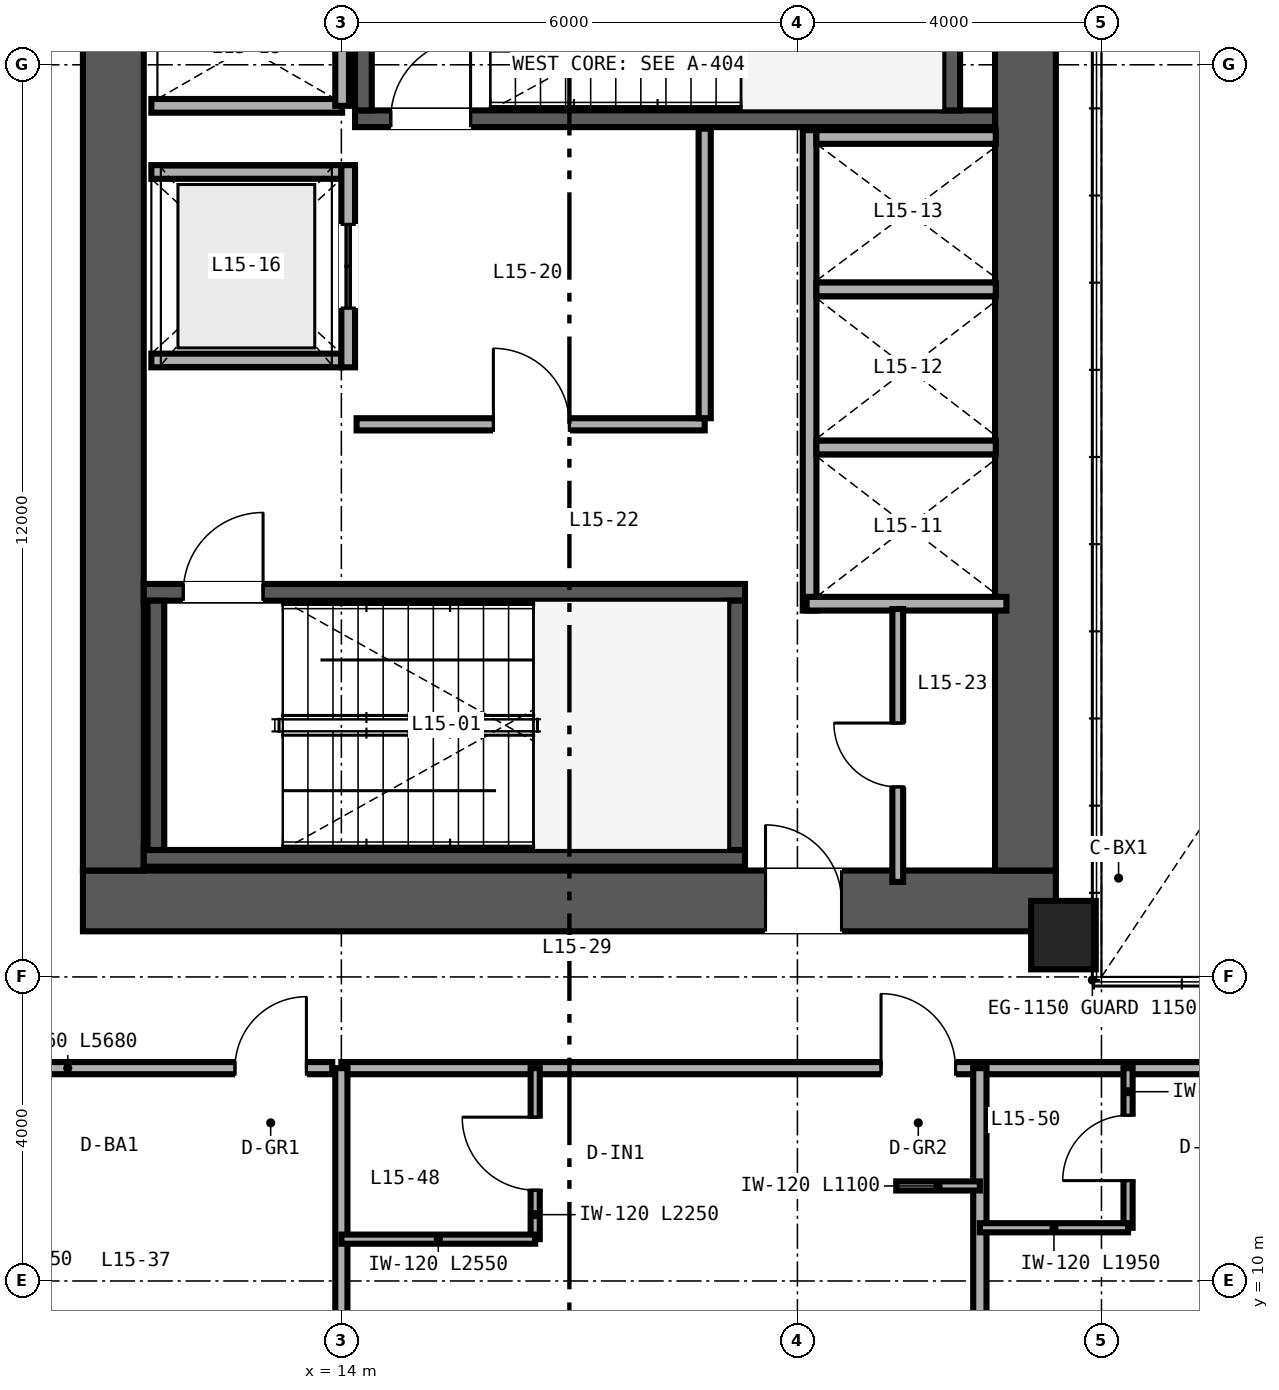
"""IFC4 building model, lengths in metres.
Left out: names, types, materials, properties, quantities, classifications, styles, units other than length and angle.
Written with IfcOpenShell. Run it as: python <this file> out.ifc"""

import sys

from ifc_helpers import new_model, si_unit, direction, frame, frame_2d, origin, origin_2d, place, context, subcontext, project, spatial, rectangle, hollow_rectangle, extrude, source, transform, mapped, element, fill, save


model = new_model("IFC4")
c1 = context("Model", 3, precision=1e-05, world=origin(), true_north=direction((0.0, 1.0)))
c2 = subcontext(c1, "Body", "Model", "MODEL_VIEW")
j1 = project(units=[si_unit("LENGTHUNIT", "METRE"), si_unit("PLANEANGLEUNIT", "RADIAN")], contexts=[c1])
p1 = place(None, origin())
s1 = spatial("IfcSite", under=j1, at=p1, CompositionType="ELEMENT")
p2 = place(p1, origin())
s2 = spatial("IfcBuilding", under=s1, at=p2, CompositionType="ELEMENT")
p3 = place(p2, frame((0.0, 0.0, 63.6)))
s3 = spatial("IfcBuildingStorey", under=s2, at=p3, CompositionType="ELEMENT", Elevation=63.6)
p4 = place(p3, frame((10.6, 15.0, 0.0), z_axis=(0.0, 0.0, 1.0), x_axis=(1.0, 0.0, 0.0)))
e1 = element("IfcWall", 1, at=p4, inside=s3, PredefinedType="SHEAR", context=c2, shape_type="SweptSolid", body=[
    extrude(rectangle(XDim=12.8, YDim=0.8, at=frame_2d((6.4, 0.0))), origin(), (0.0, 0.0, 1.0), 3.35),
])
p5 = place(p4, frame((8.98, 0.0, 0.0)))
e2 = element("IfcOpeningElement", 2, at=p5, cuts=e1, PredefinedType="OPENING", context=c2, shape_type="SweptSolid", body=[
    extrude(rectangle(XDim=1.0, YDim=2.15, at=frame_2d((0.5, 1.075))), frame((0.0, 0.41, 0.0), z_axis=(0.0, -1.0, 0.0), x_axis=(1.0, 0.0, 0.0)), (0.0, 0.0, 1.0), 0.82),
])
for number, where, z_axis, x_axis in (
    (3, (11.0, 15.4, 0.0), (0.0, 0.0, 1.0), (0.0, 1.0, 0.0)),
    (4, (23.0, 15.4, 0.0), (0.0, 0.0, 1.0), (0.0, 1.0, 0.0)),
):
    element("IfcWall", number, at=place(p3, frame(where, z_axis=z_axis, x_axis=x_axis)), inside=s3, PredefinedType="SHEAR", context=c2, shape_type="SweptSolid", body=[
        extrude(rectangle(XDim=21.2, YDim=0.8, at=frame_2d((10.6, 0.0))), origin(), (0.0, 0.0, 1.0), 3.35),
    ])
p6 = place(p3, frame((11.4, 15.56, 0.0), z_axis=(0.0, 0.0, 1.0), x_axis=(1.0, 0.0, 0.0)))
e5 = element("IfcWall", 5, at=p6, inside=s3, PredefinedType="SHEAR", context=c2, shape_type="SweptSolid", body=[
    extrude(rectangle(XDim=7.91, YDim=0.22, at=frame_2d((3.955, 0.0))), origin(), (0.0, 0.0, 1.0), 3.4),
])
p7 = place(p3, frame((11.4, 19.06, 0.0), z_axis=(0.0, 0.0, 1.0), x_axis=(1.0, 0.0, 0.0)))
e6 = element("IfcWall", 6, at=p7, inside=s3, PredefinedType="SHEAR", context=c2, shape_type="SweptSolid", body=[
    extrude(rectangle(XDim=7.91, YDim=0.22, at=frame_2d((3.955, 0.0))), origin(), (0.0, 0.0, 1.0), 3.4),
])
p8 = place(p7, frame((0.52, 0.0, 0.0)))
e7 = element("IfcOpeningElement", 7, at=p8, cuts=e6, PredefinedType="OPENING", context=c2, shape_type="SweptSolid", body=[
    extrude(rectangle(XDim=1.05, YDim=2.15, at=frame_2d((0.525, 1.075))), frame((0.0, 0.12, 0.0), z_axis=(0.0, -1.0, 0.0), x_axis=(1.0, 0.0, 0.0)), (0.0, 0.0, 1.0), 0.24),
])
for number, where, z_axis, x_axis in (
    (8, (11.56, 15.67, 0.0), (0.0, 0.0, 1.0), (0.0, 1.0, 0.0)),
    (9, (19.2, 15.67, 0.0), (0.0, 0.0, 1.0), (0.0, 1.0, 0.0)),
):
    element("IfcWall", number, at=place(p3, frame(where, z_axis=z_axis, x_axis=x_axis)), inside=s3, PredefinedType="SHEAR", context=c2, shape_type="SweptSolid", body=[
        extrude(rectangle(XDim=3.28, YDim=0.22, at=frame_2d((1.64, 0.0))), origin(), (0.0, 0.0, 1.0), 3.4),
    ])
p9 = place(p3, frame((14.18, 25.29, 0.0), z_axis=(0.0, 0.0, 1.0), x_axis=(1.0, 0.0, 0.0)))
e10 = element("IfcWall", 10, at=p9, inside=s3, PredefinedType="SHEAR", context=c2, shape_type="SweptSolid", body=[
    extrude(rectangle(XDim=8.42, YDim=0.22, at=frame_2d((4.21, 0.0))), origin(), (0.0, 0.0, 1.0), 3.4),
])
p10 = place(p9, frame((0.47, 0.0, 0.0)))
e11 = element("IfcOpeningElement", 11, at=p10, cuts=e10, PredefinedType="OPENING", context=c2, shape_type="SweptSolid", body=[
    extrude(rectangle(XDim=1.05, YDim=2.15, at=frame_2d((0.525, 1.075))), frame((0.0, 0.12, 0.0), z_axis=(0.0, -1.0, 0.0), x_axis=(1.0, 0.0, 0.0)), (0.0, 0.0, 1.0), 0.24),
])
for number, where, z_axis, x_axis in (
    (12, (14.29, 25.4, 0.0), (0.0, 0.0, 1.0), (0.0, 1.0, 0.0)),
    (13, (22.03, 25.4, 0.0), (0.0, 0.0, 1.0), (0.0, 1.0, 0.0)),
):
    element("IfcWall", number, at=place(p3, frame(where, z_axis=z_axis, x_axis=x_axis)), inside=s3, PredefinedType="SHEAR", context=c2, shape_type="SweptSolid", body=[
        extrude(rectangle(XDim=3.28, YDim=0.22, at=frame_2d((1.64, 0.0))), origin(), (0.0, 0.0, 1.0), 3.4),
    ])
m1 = source(origin(), c2, "Body", "SweptSolid", [
    extrude(hollow_rectangle(XDim=0.85, YDim=0.9, WallThickness=0.04, at=origin_2d()), origin(), (0.0, 0.0, 1.0), 3.35),
])
p11 = place(p3, frame((23.5, 14.55, 0.0), z_axis=(0.0, 0.0, 1.0), x_axis=(1.0, 0.0, 0.0)))
e14 = element("IfcColumn", 14, at=p11, inside=s3, PredefinedType="COLUMN", context=c2, shape_type="MappedRepresentation", body=[
    mapped(m1, transform((0.0, 0.0, 0.0), scale=1.0)),
])
p12 = place(p3, frame((20.16, 18.82, 0.0), z_axis=(0.0, 0.0, 1.0), x_axis=(0.0, 1.0, 0.0)))
e15 = element("IfcWall", 15, at=p12, inside=s3, PredefinedType="SOLIDWALL", context=c2, shape_type="SweptSolid", body=[
    extrude(rectangle(XDim=6.32, YDim=0.18, at=frame_2d((3.16, 0.0))), origin(), (0.0, 0.0, 1.0), 2.36),
])
p13 = place(p3, frame((20.12, 18.91, 0.0), z_axis=(0.0, 0.0, 1.0), x_axis=(1.0, 0.0, 0.0)))
e16 = element("IfcWall", 16, at=p13, inside=s3, PredefinedType="SOLIDWALL", context=c2, shape_type="SweptSolid", body=[
    extrude(rectangle(XDim=2.63, YDim=0.18, at=frame_2d((1.315, 0.0))), origin(), (0.0, 0.0, 1.0), 3.35),
])
p14 = place(p3, frame((20.25, 25.05, 0.0), z_axis=(0.0, 0.0, 1.0), x_axis=(1.0, 0.0, 0.0)))
e17 = element("IfcWall", 17, at=p14, inside=s3, PredefinedType="SOLIDWALL", context=c2, shape_type="SweptSolid", body=[
    extrude(rectangle(XDim=2.36, YDim=0.18, at=frame_2d((1.18, 0.0))), origin(), (0.0, 0.0, 1.0), 3.35),
])
p15 = place(p3, frame((20.25, 20.965, 0.0), z_axis=(0.0, 0.0, 1.0), x_axis=(1.0, 0.0, 0.0)))
e18 = element("IfcWall", 18, at=p15, inside=s3, PredefinedType="SOLIDWALL", context=c2, shape_type="SweptSolid", body=[
    extrude(rectangle(XDim=2.36, YDim=0.18, at=frame_2d((1.18, 0.0))), origin(), (0.0, 0.0, 1.0), 2.36),
])
p16 = place(p3, frame((20.25, 23.045, 0.0), z_axis=(0.0, 0.0, 1.0), x_axis=(1.0, 0.0, 0.0)))
e19 = element("IfcWall", 19, at=p16, inside=s3, PredefinedType="SOLIDWALL", context=c2, shape_type="SweptSolid", body=[
    extrude(rectangle(XDim=2.36, YDim=0.18, at=frame_2d((1.18, 0.0))), origin(), (0.0, 0.0, 1.0), 3.35),
])
for number, where, z_axis, x_axis in (
    (20, (11.5, 22.11, 0.0), (0.0, 0.0, 1.0), (1.0, 0.0, 0.0)),
    (21, (11.5, 24.59, 0.0), (0.0, 0.0, 1.0), (1.0, 0.0, 0.0)),
):
    element("IfcWall", number, at=place(p3, frame(where, z_axis=z_axis, x_axis=x_axis)), inside=s3, PredefinedType="SOLIDWALL", context=c2, shape_type="SweptSolid", body=[
        extrude(rectangle(XDim=2.5, YDim=0.18, at=frame_2d((1.25, 0.0))), origin(), (0.0, 0.0, 1.0), 3.35),
    ])
p17 = place(p3, frame((14.09, 22.02, 0.0), z_axis=(0.0, 0.0, 1.0), x_axis=(0.0, 1.0, 0.0)))
e22 = element("IfcWall", 22, at=p17, inside=s3, PredefinedType="SOLIDWALL", context=c2, shape_type="SweptSolid", body=[
    extrude(rectangle(XDim=2.66, YDim=0.18, at=frame_2d((1.33, 0.0))), origin(), (0.0, 0.0, 1.0), 3.35),
])
p18 = place(p17, frame((0.78, 0.0, 0.0)))
e23 = element("IfcOpeningElement", 23, at=p18, cuts=e22, PredefinedType="OPENING", context=c2, shape_type="SweptSolid", body=[
    extrude(rectangle(XDim=1.1, YDim=2.2, at=frame_2d((0.55, 1.1))), frame((0.0, 0.1, 0.0), z_axis=(0.0, -1.0, 0.0), x_axis=(1.0, 0.0, 0.0)), (0.0, 0.0, 1.0), 0.2),
])
p19 = place(p3, frame((11.5, 25.46, 0.0), z_axis=(0.0, 0.0, 1.0), x_axis=(1.0, 0.0, 0.0)))
e24 = element("IfcWall", 24, at=p19, inside=s3, PredefinedType="SOLIDWALL", context=c2, shape_type="SweptSolid", body=[
    extrude(rectangle(XDim=2.51, YDim=0.18, at=frame_2d((1.255, 0.0))), origin(), (0.0, 0.0, 1.0), 3.35),
])
p20 = place(p3, frame((14.01, 25.46, 0.0), z_axis=(0.0, 0.0, 1.0), x_axis=(0.0, 1.0, 0.0)))
e25 = element("IfcWall", 25, at=p20, inside=s3, PredefinedType="SOLIDWALL", context=c2, shape_type="SweptSolid", body=[
    extrude(rectangle(XDim=3.08, YDim=0.18, at=frame_2d((1.54, 0.0))), origin(), (0.0, 0.0, 1.0), 3.35),
])
p21 = place(p3, frame((14.2, 21.27, 0.0), z_axis=(0.0, 0.0, 1.0), x_axis=(1.0, 0.0, 0.0)))
e26 = element("IfcWall", 26, at=p21, inside=s3, PredefinedType="PARTITIONING", context=c2, shape_type="SweptSolid", body=[
    extrude(rectangle(XDim=4.58, YDim=0.16, at=frame_2d((2.29, 0.0))), origin(), (0.0, 0.0, 1.0), 3.35),
])
p22 = place(p21, frame((1.8, 0.0, 0.0)))
e27 = element("IfcOpeningElement", 27, at=p22, cuts=e26, PredefinedType="OPENING", context=c2, shape_type="SweptSolid", body=[
    extrude(rectangle(XDim=1.0, YDim=2.15, at=frame_2d((0.5, 1.075))), frame((0.0, 0.09, 0.0), z_axis=(0.0, -1.0, 0.0), x_axis=(1.0, 0.0, 0.0)), (0.0, 0.0, 1.0), 0.18),
])
p23 = place(p3, frame((18.78, 21.35, 0.0), z_axis=(0.0, 0.0, 1.0), x_axis=(0.0, 1.0, 0.0)))
e28 = element("IfcWall", 28, at=p23, inside=s3, PredefinedType="PARTITIONING", context=c2, shape_type="SweptSolid", body=[
    extrude(rectangle(XDim=3.81, YDim=0.16, at=frame_2d((1.905, 0.0))), origin(), (0.0, 0.0, 1.0), 3.35),
])
p24 = place(p3, frame((21.32, 15.25, 0.0), z_axis=(0.0, 0.0, 1.0), x_axis=(0.0, 1.0, 0.0)))
e29 = element("IfcWall", 29, at=p24, inside=s3, PredefinedType="PARTITIONING", context=c2, shape_type="SweptSolid", body=[
    extrude(rectangle(XDim=3.59, YDim=0.142, at=frame_2d((1.795, 0.0))), origin(), (0.0, 0.0, 1.0), 3.35),
])
p25 = place(p24, frame((1.25, 0.0, 0.0)))
e30 = element("IfcOpeningElement", 30, at=p25, cuts=e29, PredefinedType="OPENING", context=c2, shape_type="SweptSolid", body=[
    extrude(rectangle(XDim=0.84, YDim=2.1, at=frame_2d((0.42, 1.05))), frame((0.0, 0.081, 0.0), z_axis=(0.0, -1.0, 0.0), x_axis=(1.0, 0.0, 0.0)), (0.0, 0.0, 1.0), 0.162),
])
p26 = place(p3, frame((8.2, 12.8, 0.0), z_axis=(0.0, 0.0, 1.0), x_axis=(1.0, 0.0, 0.0)))
e31 = element("IfcWall", 31, at=p26, inside=s3, PredefinedType="PARTITIONING", context=c2, shape_type="SweptSolid", body=[
    extrude(rectangle(XDim=5.68, YDim=0.16, at=frame_2d((2.84, 0.0))), origin(), (0.0, 0.0, 1.0), 3.35),
])
p27 = place(p26, frame((4.4, 0.0, 0.0)))
e32 = element("IfcOpeningElement", 32, at=p27, cuts=e31, PredefinedType="OPENING", context=c2, shape_type="SweptSolid", body=[
    extrude(rectangle(XDim=0.94, YDim=2.15, at=frame_2d((0.47, 1.075))), frame((0.0, 0.09, 0.0), z_axis=(0.0, -1.0, 0.0), x_axis=(1.0, 0.0, 0.0)), (0.0, 0.0, 1.0), 0.18),
])
p28 = place(p3, frame((14.0, 12.8, 0.0), z_axis=(0.0, 0.0, 1.0), x_axis=(1.0, 0.0, 0.0)))
e33 = element("IfcWall", 33, at=p28, inside=s3, PredefinedType="PARTITIONING", context=c2, shape_type="SweptSolid", body=[
    extrude(rectangle(XDim=36.0, YDim=0.16, at=frame_2d((18.0, 0.0))), origin(), (0.0, 0.0, 1.0), 2.571),
])
p29 = place(p28, frame((7.1, 0.0, 0.0)))
e34 = element("IfcOpeningElement", 34, at=p29, cuts=e33, PredefinedType="OPENING", context=c2, shape_type="SweptSolid", body=[
    extrude(rectangle(XDim=0.98, YDim=2.2, at=frame_2d((0.49, 1.1))), frame((0.0, 0.09, 0.0), z_axis=(0.0, -1.0, 0.0), x_axis=(1.0, 0.0, 0.0)), (0.0, 0.0, 1.0), 0.18),
])
p30 = place(p28, frame((15.5, 0.0, 0.0)))
e35 = element("IfcOpeningElement", 35, at=p30, cuts=e33, PredefinedType="OPENING", context=c2, shape_type="SweptSolid", body=[
    extrude(rectangle(XDim=0.98, YDim=2.2, at=frame_2d((0.49, 1.1))), frame((0.0, 0.09, 0.0), z_axis=(0.0, -1.0, 0.0), x_axis=(1.0, 0.0, 0.0)), (0.0, 0.0, 1.0), 0.18),
])
p31 = place(p28, frame((23.9, 0.0, 0.0)))
e36 = element("IfcOpeningElement", 36, at=p31, cuts=e33, PredefinedType="OPENING", context=c2, shape_type="SweptSolid", body=[
    extrude(rectangle(XDim=0.98, YDim=2.2, at=frame_2d((0.49, 1.1))), frame((0.0, 0.09, 0.0), z_axis=(0.0, -1.0, 0.0), x_axis=(1.0, 0.0, 0.0)), (0.0, 0.0, 1.0), 0.18),
])
p32 = place(p28, frame((29.34, 0.0, 0.0)))
e37 = element("IfcOpeningElement", 37, at=p32, cuts=e33, PredefinedType="OPENING", context=c2, shape_type="SweptSolid", body=[
    extrude(rectangle(XDim=0.94, YDim=2.15, at=frame_2d((0.47, 1.075))), frame((0.0, 0.09, 0.0), z_axis=(0.0, -1.0, 0.0), x_axis=(1.0, 0.0, 0.0)), (0.0, 0.0, 1.0), 0.18),
])
p33 = place(p28, frame((34.74, 0.0, 0.0)))
e38 = element("IfcOpeningElement", 38, at=p33, cuts=e33, PredefinedType="OPENING", context=c2, shape_type="SweptSolid", body=[
    extrude(rectangle(XDim=0.94, YDim=2.15, at=frame_2d((0.47, 1.075))), frame((0.0, 0.09, 0.0), z_axis=(0.0, -1.0, 0.0), x_axis=(1.0, 0.0, 0.0)), (0.0, 0.0, 1.0), 0.18),
])
p34 = place(p3, frame((14.0, 2.36, 0.0), z_axis=(0.0, 0.0, 1.0), x_axis=(0.0, 1.0, 0.0)))
e39 = element("IfcWall", 39, at=p34, inside=s3, PredefinedType="PARTITIONING", context=c2, shape_type="SweptSolid", body=[
    extrude(rectangle(XDim=10.44, YDim=0.16, at=frame_2d((5.22, 0.0))), origin(), (0.0, 0.0, 1.0), 2.657),
])
p35 = place(p3, frame((22.4, 2.36, 0.0), z_axis=(0.0, 0.0, 1.0), x_axis=(0.0, 1.0, 0.0)))
e40 = element("IfcWall", 40, at=p35, inside=s3, PredefinedType="PARTITIONING", context=c2, shape_type="SweptSolid", body=[
    extrude(rectangle(XDim=10.44, YDim=0.175, at=frame_2d((5.22, 0.0))), origin(), (0.0, 0.0, 1.0), 2.813),
])
p36 = place(p3, frame((16.55, 10.55, 0.0), z_axis=(0.0, 0.0, 1.0), x_axis=(0.0, 1.0, 0.0)))
e41 = element("IfcWall", 41, at=p36, inside=s3, PredefinedType="PARTITIONING", context=c2, shape_type="SweptSolid", body=[
    extrude(rectangle(XDim=2.25, YDim=0.12, at=frame_2d((1.125, 0.0))), origin(), (0.0, 0.0, 1.0), 3.35),
])
p37 = place(p36, frame((0.645, 0.0, 0.0)))
e42 = element("IfcOpeningElement", 42, at=p37, cuts=e41, PredefinedType="OPENING", context=c2, shape_type="SweptSolid", body=[
    extrude(rectangle(XDim=0.96, YDim=2.15, at=frame_2d((0.48, 1.075))), frame((0.0, 0.07, 0.0), z_axis=(0.0, -1.0, 0.0), x_axis=(1.0, 0.0, 0.0)), (0.0, 0.0, 1.0), 0.14),
])
p38 = place(p3, frame((14.0, 10.55, 0.0), z_axis=(0.0, 0.0, 1.0), x_axis=(1.0, 0.0, 0.0)))
e43 = element("IfcWall", 43, at=p38, inside=s3, PredefinedType="PARTITIONING", context=c2, shape_type="SweptSolid", body=[
    extrude(rectangle(XDim=2.55, YDim=0.12, at=frame_2d((1.275, 0.0))), origin(), (0.0, 0.0, 1.0), 3.35),
])
p39 = place(p3, frame((21.3, 11.25, 0.0), z_axis=(0.0, 0.0, 1.0), x_axis=(1.0, 0.0, 0.0)))
e44 = element("IfcWall", 44, at=p39, inside=s3, PredefinedType="PARTITIONING", context=c2, shape_type="SweptSolid", body=[
    extrude(rectangle(XDim=1.1, YDim=0.12, at=frame_2d((0.55, 0.0))), origin(), (0.0, 0.0, 1.0), 3.35),
])
p40 = place(p3, frame((24.35, 10.7, 0.0), z_axis=(0.0, 0.0, 1.0), x_axis=(0.0, 1.0, 0.0)))
e45 = element("IfcWall", 45, at=p40, inside=s3, PredefinedType="PARTITIONING", context=c2, shape_type="SweptSolid", body=[
    extrude(rectangle(XDim=2.1, YDim=0.12, at=frame_2d((1.05, 0.0))), origin(), (0.0, 0.0, 1.0), 3.35),
])
p41 = place(p40, frame((0.62, 0.0, 0.0)))
e46 = element("IfcOpeningElement", 46, at=p41, cuts=e45, PredefinedType="OPENING", context=c2, shape_type="SweptSolid", body=[
    extrude(rectangle(XDim=0.86, YDim=2.1, at=frame_2d((0.43, 1.05))), frame((0.0, 0.07, 0.0), z_axis=(0.0, -1.0, 0.0), x_axis=(1.0, 0.0, 0.0)), (0.0, 0.0, 1.0), 0.14),
])
p42 = place(p3, frame((22.4, 10.7, 0.0), z_axis=(0.0, 0.0, 1.0), x_axis=(1.0, 0.0, 0.0)))
e47 = element("IfcWall", 47, at=p42, inside=s3, PredefinedType="PARTITIONING", context=c2, shape_type="SweptSolid", body=[
    extrude(rectangle(XDim=1.95, YDim=0.12, at=frame_2d((0.975, 0.0))), origin(), (0.0, 0.0, 1.0), 2.571),
])
m2 = source(origin(), c2, "Body", "SweptSolid", [
    extrude(rectangle(XDim=1.05, YDim=2.15, at=frame_2d((0.525, 1.075))), frame((0.0, 0.025, 0.0), z_axis=(0.0, -1.0, 0.0), x_axis=(1.0, 0.0, 0.0)), (0.0, 0.0, 1.0), 0.05),
])
p43 = place(p8, origin())
e48 = element("IfcDoor", 48, at=p43, inside=s3, OperationType="SINGLE_SWING_RIGHT", PredefinedType="DOOR", context=c2, shape_type="MappedRepresentation", body=[
    mapped(m2, transform((0.0, 0.0, 0.0), scale=1.0)),
])
fill(e7, e48)
p44 = place(p10, origin())
e49 = element("IfcDoor", 49, at=p44, inside=s3, OperationType="SINGLE_SWING_RIGHT", PredefinedType="DOOR", context=c2, shape_type="MappedRepresentation", body=[
    mapped(m2, transform((0.0, 0.0, 0.0), scale=1.0)),
])
fill(e11, e49)
m3 = source(origin(), c2, "Body", "SweptSolid", [
    extrude(rectangle(XDim=1.1, YDim=2.2, at=frame_2d((0.55, 1.1))), frame((0.0, 0.025, 0.0), z_axis=(0.0, -1.0, 0.0), x_axis=(1.0, 0.0, 0.0)), (0.0, 0.0, 1.0), 0.05),
])
p45 = place(p18, origin())
e50 = element("IfcDoor", 50, at=p45, inside=s3, OperationType="DOUBLE_DOOR_SLIDING", PredefinedType="DOOR", context=c2, shape_type="MappedRepresentation", body=[
    mapped(m3, transform((0.0, 0.0, 0.0), scale=1.0)),
])
fill(e23, e50)
m4 = source(origin(), c2, "Body", "SweptSolid", [
    extrude(rectangle(XDim=1.0, YDim=2.15, at=frame_2d((0.5, 1.075))), frame((0.0, 0.025, 0.0), z_axis=(0.0, -1.0, 0.0), x_axis=(1.0, 0.0, 0.0)), (0.0, 0.0, 1.0), 0.05),
])
p46 = place(p22, origin())
e51 = element("IfcDoor", 51, at=p46, inside=s3, OperationType="SINGLE_SWING_LEFT", PredefinedType="DOOR", context=c2, shape_type="MappedRepresentation", body=[
    mapped(m4, transform((0.0, 0.0, 0.0), scale=1.0)),
])
fill(e27, e51)
m5 = source(origin(), c2, "Body", "SweptSolid", [
    extrude(rectangle(XDim=0.84, YDim=2.1, at=frame_2d((0.42, 1.05))), frame((0.0, 0.025, 0.0), z_axis=(0.0, -1.0, 0.0), x_axis=(1.0, 0.0, 0.0)), (0.0, 0.0, 1.0), 0.05),
])
p47 = place(p25, origin())
e52 = element("IfcDoor", 52, at=p47, inside=s3, OperationType="SINGLE_SWING_RIGHT", PredefinedType="DOOR", context=c2, shape_type="MappedRepresentation", body=[
    mapped(m5, transform((0.0, 0.0, 0.0), scale=1.0)),
])
fill(e30, e52)
p48 = place(p5, origin())
e53 = element("IfcDoor", 53, at=p48, inside=s3, OperationType="SINGLE_SWING_LEFT", PredefinedType="DOOR", context=c2, shape_type="MappedRepresentation", body=[
    mapped(m4, transform((0.0, 0.0, 0.0), scale=1.0)),
])
fill(e2, e53)
m6 = source(origin(), c2, "Body", "SweptSolid", [
    extrude(rectangle(XDim=0.94, YDim=2.15, at=frame_2d((0.47, 1.075))), frame((0.0, 0.025, 0.0), z_axis=(0.0, -1.0, 0.0), x_axis=(1.0, 0.0, 0.0)), (0.0, 0.0, 1.0), 0.05),
])
p49 = place(p27, origin())
e54 = element("IfcDoor", 54, at=p49, inside=s3, OperationType="SINGLE_SWING_RIGHT", PredefinedType="DOOR", context=c2, shape_type="MappedRepresentation", body=[
    mapped(m6, transform((0.0, 0.0, 0.0), scale=1.0)),
])
fill(e32, e54)
m7 = source(origin(), c2, "Body", "SweptSolid", [
    extrude(rectangle(XDim=0.96, YDim=2.15, at=frame_2d((0.48, 1.075))), frame((0.0, 0.025, 0.0), z_axis=(0.0, -1.0, 0.0), x_axis=(1.0, 0.0, 0.0)), (0.0, 0.0, 1.0), 0.05),
])
p50 = place(p37, origin())
e55 = element("IfcDoor", 55, at=p50, inside=s3, OperationType="SINGLE_SWING_RIGHT", PredefinedType="DOOR", context=c2, shape_type="MappedRepresentation", body=[
    mapped(m7, transform((0.0, 0.0, 0.0), scale=1.0)),
])
fill(e42, e55)
m8 = source(origin(), c2, "Body", "SweptSolid", [
    extrude(rectangle(XDim=0.86, YDim=2.1, at=frame_2d((0.43, 1.05))), frame((0.0, 0.025, 0.0), z_axis=(0.0, -1.0, 0.0), x_axis=(1.0, 0.0, 0.0)), (0.0, 0.0, 1.0), 0.05),
])
p51 = place(p41, origin())
e56 = element("IfcDoor", 56, at=p51, inside=s3, OperationType="SINGLE_SWING_LEFT", PredefinedType="DOOR", context=c2, shape_type="MappedRepresentation", body=[
    mapped(m8, transform((0.0, 0.0, 0.0), scale=1.0)),
])
fill(e46, e56)
m9 = source(origin(), c2, "Body", "SweptSolid", [
    extrude(rectangle(XDim=0.98, YDim=2.2, at=frame_2d((0.49, 1.1))), frame((0.0, 0.025, 0.0), z_axis=(0.0, -1.0, 0.0), x_axis=(1.0, 0.0, 0.0)), (0.0, 0.0, 1.0), 0.05),
])
p52 = place(p29, origin())
e57 = element("IfcDoor", 57, at=p52, inside=s3, OperationType="SINGLE_SWING_LEFT", PredefinedType="DOOR", context=c2, shape_type="MappedRepresentation", body=[
    mapped(m9, transform((0.0, 0.0, 0.0), scale=1.0)),
])
fill(e34, e57)
save(model, sys.argv[1])
